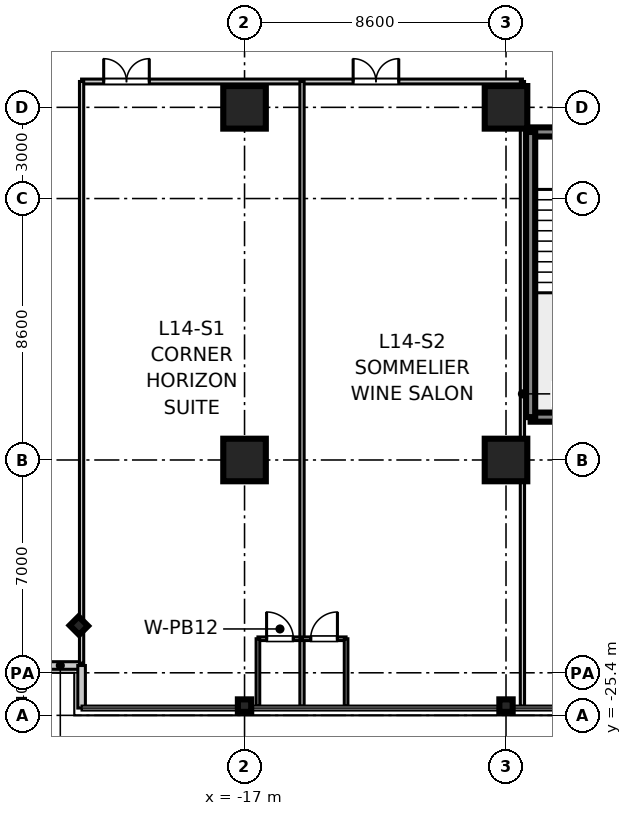
"""IFC4 building model, lengths in metres.
Left out: names, types, materials, properties, quantities, classifications, styles, units other than length and angle.
Written with IfcOpenShell. Run it as: python <this file> out.ifc"""

import sys

from ifc_helpers import new_model, si_unit, direction, frame, frame_2d, origin, origin_2d, place, context, subcontext, project, spatial, rectangle, i_section, extrude, source, transform, mapped, element, fill, save


model = new_model("IFC4")
c1 = context("Model", 3, precision=1e-05, world=origin(), true_north=direction((0.0, 1.0)))
c2 = subcontext(c1, "Body", "Model", "MODEL_VIEW")
j1 = project(units=[si_unit("LENGTHUNIT", "METRE"), si_unit("PLANEANGLEUNIT", "RADIAN")], contexts=[c1])
p1 = place(None, origin())
s1 = spatial("IfcSite", under=j1, at=p1, CompositionType="ELEMENT")
p2 = place(p1, origin())
s2 = spatial("IfcBuilding", under=s1, at=p2, CompositionType="ELEMENT")
p3 = place(p2, frame((0.0, 0.0, 61.6)))
s3 = spatial("IfcBuildingStorey", under=s2, at=p3, CompositionType="ELEMENT", Elevation=61.6)
m1 = source(origin(), c2, "Body", "SweptSolid", [
    extrude(rectangle(XDim=1.4, YDim=1.4, at=origin_2d()), origin(), (0.0, 0.0, 1.0), 3.605),
])
for number, where, z_axis, x_axis in (
    (1, (-17.0, -17.0, 0.0), (0.0, 0.0, 1.0), (1.0, 0.0, 0.0)),
    (2, (-17.0, -5.4, 0.0), (0.0, 0.0, 1.0), (1.0, 0.0, 0.0)),
    (3, (-8.4, -17.0, 0.0), (0.0, 0.0, 1.0), (1.0, 0.0, 0.0)),
    (4, (-8.4, -5.4, 0.0), (0.0, 0.0, 1.0), (1.0, 0.0, 0.0)),
):
    element("IfcColumn", number, at=place(p3, frame(where, z_axis=z_axis, x_axis=x_axis)), inside=s3, PredefinedType="COLUMN", context=c2, shape_type="MappedRepresentation", body=[
        mapped(m1, transform((0.0, 0.0, 0.0), scale=1.0)),
    ])
m2 = source(origin(), c2, "Body", "SweptSolid", [
    extrude(i_section(OverallWidth=0.412, OverallDepth=0.438, WebThickness=0.023, FlangeThickness=0.036, at=origin_2d()), origin(), (0.0, 0.0, 1.0), 3.605),
])
for number, where, z_axis, x_axis in (
    (5, (-17.0, -25.08, 0.0), (0.0, 0.0, 1.0), (0.0, 1.0, 0.0)),
    (6, (-8.4, -25.08, 0.0), (0.0, 0.0, 1.0), (0.0, 1.0, 0.0)),
    (7, (-22.45, -22.45, 0.0), (0.0, 0.0, 1.0), (0.707, 0.707, 0.0)),
):
    element("IfcColumn", number, at=place(p3, frame(where, z_axis=z_axis, x_axis=x_axis)), inside=s3, PredefinedType="COLUMN", context=c2, shape_type="MappedRepresentation", body=[
        mapped(m2, transform((0.0, 0.0, 0.0), scale=1.0)),
    ])
m3 = source(origin(), c2, "Body", "SweptSolid", [
    extrude(rectangle(XDim=3.98, YDim=0.3, at=frame_2d((1.99, 0.0))), origin(), (0.0, 0.0, 1.0), 3.37),
])
p4 = place(p3, frame((-7.59, -15.59, 0.0), z_axis=(0.0, 0.0, 1.0), x_axis=(1.0, 0.0, 0.0)))
e8 = element("IfcWall", 8, at=p4, inside=s3, PredefinedType="SHEAR", context=c2, shape_type="MappedRepresentation", body=[
    mapped(m3, transform((0.0, 0.0, 0.0), scale=1.0)),
])
p5 = place(p3, frame((-7.59, -6.21, 0.0), z_axis=(0.0, 0.0, 1.0), x_axis=(1.0, 0.0, 0.0)))
e9 = element("IfcWall", 9, at=p5, inside=s3, PredefinedType="SHEAR", context=c2, shape_type="MappedRepresentation", body=[
    mapped(m3, transform((0.0, 0.0, 0.0), scale=1.0)),
])
p6 = place(p5, frame((1.44, 0.0, 0.0)))
e10 = element("IfcOpeningElement", 10, at=p6, cuts=e9, PredefinedType="OPENING", context=c2, shape_type="SweptSolid", body=[
    extrude(rectangle(XDim=1.1, YDim=2.15, at=frame_2d((0.55, 1.075))), frame((0.0, 0.16, 0.0), z_axis=(0.0, -1.0, 0.0), x_axis=(1.0, 0.0, 0.0)), (0.0, 0.0, 1.0), 0.32),
])
m4 = source(origin(), c2, "Body", "SweptSolid", [
    extrude(rectangle(XDim=9.38, YDim=0.3, at=frame_2d((4.69, 0.0))), origin(), (0.0, 0.0, 1.0), 3.37),
])
p7 = place(p3, frame((-7.59, -15.59, 0.0), z_axis=(0.0, 0.0, 1.0), x_axis=(0.0, 1.0, 0.0)))
e11 = element("IfcWall", 11, at=p7, inside=s3, PredefinedType="SHEAR", context=c2, shape_type="MappedRepresentation", body=[
    mapped(m4, transform((0.0, 0.0, 0.0), scale=1.0)),
])
m5 = source(origin(), c2, "Body", "SweptSolid", [
    extrude(rectangle(XDim=1.4, YDim=0.25, at=frame_2d((0.7, 0.0))), origin(), (0.0, 0.0, 1.0), 3.37),
])
for number, where, z_axis, x_axis in (
    (12, (-23.76, -23.76, 0.0), (0.0, 0.0, 1.0), (1.0, 0.0, 0.0)),
    (13, (-22.36, -25.16, 0.0), (0.0, 0.0, 1.0), (0.0, 1.0, 0.0)),
):
    element("IfcWall", number, at=place(p3, frame(where, z_axis=z_axis, x_axis=x_axis)), inside=s3, PredefinedType="STANDARD", context=c2, shape_type="MappedRepresentation", body=[
        mapped(m5, transform((0.0, 0.0, 0.0), scale=1.0)),
    ])
m6 = source(origin(), c2, "Body", "SweptSolid", [
    extrude(rectangle(XDim=14.5, YDim=0.16, at=frame_2d((7.25, 0.0))), origin(), (0.0, 0.0, 1.0), 2.71),
])
p8 = place(p3, frame((-22.36, -4.55, 0.0), z_axis=(0.0, 0.0, 1.0), x_axis=(1.0, 0.0, 0.0)))
e14 = element("IfcWall", 14, at=p8, inside=s3, PredefinedType="PARTITIONING", context=c2, shape_type="MappedRepresentation", body=[
    mapped(m6, transform((0.0, 0.0, 0.0), scale=1.0)),
])
p9 = place(p8, frame((0.727, 0.0, 0.0)))
e15 = element("IfcOpeningElement", 15, at=p9, cuts=e14, PredefinedType="OPENING", context=c2, shape_type="SweptSolid", body=[
    extrude(rectangle(XDim=1.5, YDim=2.15, at=frame_2d((0.75, 1.075))), frame((0.0, 0.09, 0.0), z_axis=(0.0, -1.0, 0.0), x_axis=(1.0, 0.0, 0.0)), (0.0, 0.0, 1.0), 0.18),
])
p10 = place(p8, frame((8.932, 0.0, 0.0)))
e16 = element("IfcOpeningElement", 16, at=p10, cuts=e14, PredefinedType="OPENING", context=c2, shape_type="SweptSolid", body=[
    extrude(rectangle(XDim=1.5, YDim=2.15, at=frame_2d((0.75, 1.075))), frame((0.0, 0.09, 0.0), z_axis=(0.0, -1.0, 0.0), x_axis=(1.0, 0.0, 0.0)), (0.0, 0.0, 1.0), 0.18),
])
m7 = source(origin(), c2, "Body", "SweptSolid", [
    extrude(rectangle(XDim=19.13, YDim=0.14, at=frame_2d((9.565, 0.0))), origin(), (0.0, 0.0, 1.0), 2.71),
])
p11 = place(p3, frame((-22.36, -23.68, 0.0), z_axis=(0.0, 0.0, 1.0), x_axis=(0.0, 1.0, 0.0)))
e17 = element("IfcWall", 17, at=p11, inside=s3, PredefinedType="PARTITIONING", context=c2, shape_type="MappedRepresentation", body=[
    mapped(m7, transform((0.0, 0.0, 0.0), scale=1.0)),
])
m8 = source(origin(), c2, "Body", "SweptSolid", [
    extrude(rectangle(XDim=20.55, YDim=0.14, at=frame_2d((10.275, 0.0))), origin(), (0.0, 0.0, 1.0), 2.71),
])
p12 = place(p3, frame((-7.86, -25.1, 0.0), z_axis=(0.0, 0.0, 1.0), x_axis=(0.0, 1.0, 0.0)))
e18 = element("IfcWall", 18, at=p12, inside=s3, PredefinedType="PARTITIONING", context=c2, shape_type="MappedRepresentation", body=[
    mapped(m8, transform((0.0, 0.0, 0.0), scale=1.0)),
])
m9 = source(origin(), c2, "Body", "SweptSolid", [
    extrude(rectangle(XDim=1.45, YDim=0.12, at=frame_2d((0.725, 0.0))), origin(), (0.0, 0.0, 1.0), 2.71),
])
p13 = place(p3, frame((-16.56, -22.88, 0.0), z_axis=(0.0, 0.0, 1.0), x_axis=(1.0, 0.0, 0.0)))
e19 = element("IfcWall", 19, at=p13, inside=s3, PredefinedType="PARTITIONING", context=c2, shape_type="MappedRepresentation", body=[
    mapped(m9, transform((0.0, 0.0, 0.0), scale=1.0)),
])
p14 = place(p13, frame((0.285, 0.0, 0.0)))
e20 = element("IfcOpeningElement", 20, at=p14, cuts=e19, PredefinedType="OPENING", context=c2, shape_type="SweptSolid", body=[
    extrude(rectangle(XDim=0.88, YDim=2.1, at=frame_2d((0.44, 1.05))), frame((0.0, 0.07, 0.0), z_axis=(0.0, -1.0, 0.0), x_axis=(1.0, 0.0, 0.0)), (0.0, 0.0, 1.0), 0.14),
])
m10 = source(origin(), c2, "Body", "SweptSolid", [
    extrude(rectangle(XDim=2.22, YDim=0.12, at=frame_2d((1.11, 0.0))), origin(), (0.0, 0.0, 1.0), 2.71),
])
p15 = place(p3, frame((-16.56, -25.1, 0.0), z_axis=(0.0, 0.0, 1.0), x_axis=(0.0, 1.0, 0.0)))
e21 = element("IfcWall", 21, at=p15, inside=s3, PredefinedType="PARTITIONING", context=c2, shape_type="MappedRepresentation", body=[
    mapped(m10, transform((0.0, 0.0, 0.0), scale=1.0)),
])
p16 = place(p3, frame((-15.11, -25.1, 0.0), z_axis=(0.0, 0.0, 1.0), x_axis=(0.0, 1.0, 0.0)))
e22 = element("IfcWall", 22, at=p16, inside=s3, PredefinedType="PARTITIONING", context=c2, shape_type="MappedRepresentation", body=[
    mapped(m8, transform((0.0, 0.0, 0.0), scale=1.0)),
])
m11 = source(origin(), c2, "Body", "SweptSolid", [
    extrude(rectangle(XDim=1.45, YDim=0.12, at=frame_2d((0.725, 0.0))), origin(), (0.0, 0.0, 1.0), 2.71),
])
p17 = place(p3, frame((-15.11, -22.88, 0.0), z_axis=(0.0, 0.0, 1.0), x_axis=(1.0, 0.0, 0.0)))
e23 = element("IfcWall", 23, at=p17, inside=s3, PredefinedType="PARTITIONING", context=c2, shape_type="MappedRepresentation", body=[
    mapped(m11, transform((0.0, 0.0, 0.0), scale=1.0)),
])
p18 = place(p17, frame((0.285, 0.0, 0.0)))
e24 = element("IfcOpeningElement", 24, at=p18, cuts=e23, PredefinedType="OPENING", context=c2, shape_type="SweptSolid", body=[
    extrude(rectangle(XDim=0.88, YDim=2.1, at=frame_2d((0.44, 1.05))), frame((0.0, 0.07, 0.0), z_axis=(0.0, -1.0, 0.0), x_axis=(1.0, 0.0, 0.0)), (0.0, 0.0, 1.0), 0.14),
])
p19 = place(p3, frame((-13.66, -25.1, 0.0), z_axis=(0.0, 0.0, 1.0), x_axis=(0.0, 1.0, 0.0)))
e25 = element("IfcWall", 25, at=p19, inside=s3, PredefinedType="PARTITIONING", context=c2, shape_type="MappedRepresentation", body=[
    mapped(m10, transform((0.0, 0.0, 0.0), scale=1.0)),
])
m12 = source(origin(), c2, "Body", "SweptSolid", [
    extrude(rectangle(XDim=0.88, YDim=2.1, at=frame_2d((0.44, 1.05))), frame((0.0, 0.025, 0.0), z_axis=(0.0, -1.0, 0.0), x_axis=(1.0, 0.0, 0.0)), (0.0, 0.0, 1.0), 0.05),
])
p20 = place(p14, frame((0.88, 0.0, 0.0), z_axis=(0.0, 0.0, 1.0), x_axis=(-1.0, 0.0, 0.0)))
e26 = element("IfcDoor", 26, at=p20, inside=s3, OperationType="SINGLE_SWING_LEFT", PredefinedType="DOOR", context=c2, shape_type="MappedRepresentation", body=[
    mapped(m12, transform((0.0, 0.0, 0.0), scale=1.0)),
])
fill(e20, e26)
m13 = source(origin(), c2, "Body", "SweptSolid", [
    extrude(rectangle(XDim=1.5, YDim=2.15, at=frame_2d((0.75, 1.075))), frame((0.0, 0.025, 0.0), z_axis=(0.0, -1.0, 0.0), x_axis=(1.0, 0.0, 0.0)), (0.0, 0.0, 1.0), 0.05),
])
p21 = place(p9, frame((1.5, 0.0, 0.0), z_axis=(0.0, 0.0, 1.0), x_axis=(-1.0, 0.0, 0.0)))
e27 = element("IfcDoor", 27, at=p21, inside=s3, OperationType="DOUBLE_DOOR_SINGLE_SWING", PredefinedType="DOOR", context=c2, shape_type="MappedRepresentation", body=[
    mapped(m13, transform((0.0, 0.0, 0.0), scale=1.0)),
])
fill(e15, e27)
p22 = place(p18, frame((0.88, 0.0, 0.0), z_axis=(0.0, 0.0, 1.0), x_axis=(-1.0, 0.0, 0.0)))
e28 = element("IfcDoor", 28, at=p22, inside=s3, OperationType="SINGLE_SWING_RIGHT", PredefinedType="DOOR", context=c2, shape_type="MappedRepresentation", body=[
    mapped(m12, transform((0.0, 0.0, 0.0), scale=1.0)),
])
fill(e24, e28)
p23 = place(p10, frame((1.5, 0.0, 0.0), z_axis=(0.0, 0.0, 1.0), x_axis=(-1.0, 0.0, 0.0)))
e29 = element("IfcDoor", 29, at=p23, inside=s3, OperationType="DOUBLE_DOOR_SINGLE_SWING", PredefinedType="DOOR", context=c2, shape_type="MappedRepresentation", body=[
    mapped(m13, transform((0.0, 0.0, 0.0), scale=1.0)),
])
fill(e16, e29)
save(model, sys.argv[1])
